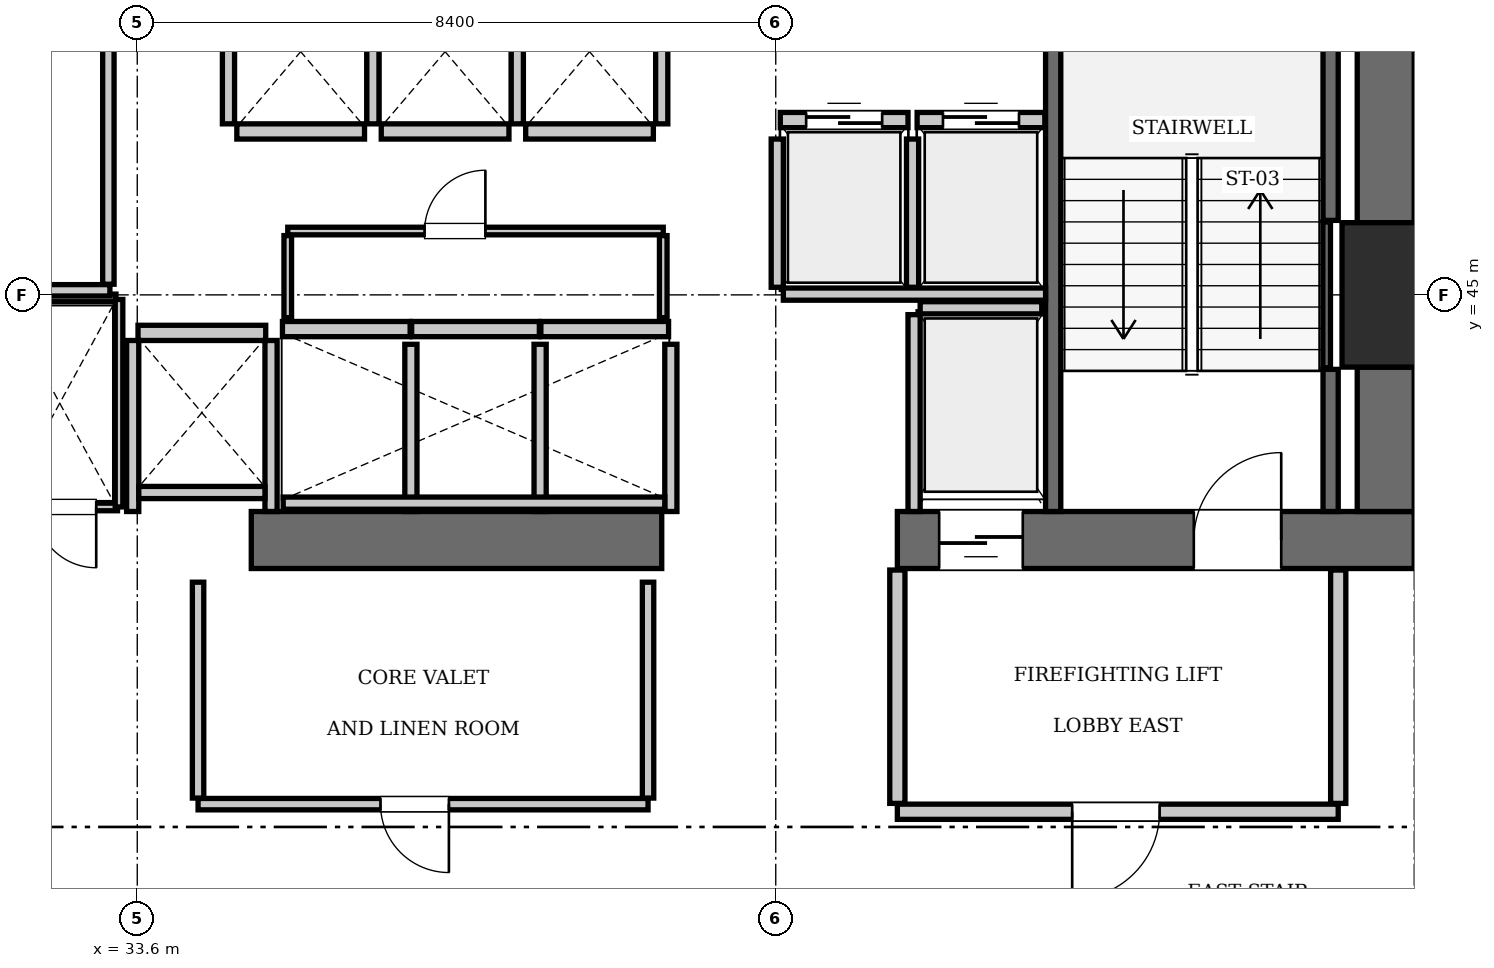
"""IFC4 building model, lengths in metres.
Left out: names, types, materials, properties, quantities, classifications, styles, units other than length and angle.
Written with IfcOpenShell. Run it as: python <this file> out.ifc"""

import sys

from ifc_helpers import new_model, si_unit, direction, frame, frame_2d, origin, origin_2d, place, context, subcontext, project, spatial, rectangle, extrude, element, fill, save


model = new_model("IFC4")
c1 = context("Model", 3, precision=1e-05, world=origin(), true_north=direction((0.0, 1.0)))
c2 = subcontext(c1, "Body", "Model", "MODEL_VIEW")
j1 = project(units=[si_unit("LENGTHUNIT", "METRE"), si_unit("PLANEANGLEUNIT", "RADIAN")], contexts=[c1])
p1 = place(None, origin())
s1 = spatial("IfcSite", under=j1, at=p1, CompositionType="ELEMENT")
p2 = place(p1, origin())
s2 = spatial("IfcBuilding", under=s1, at=p2, CompositionType="ELEMENT")
p3 = place(p2, frame((0.0, 0.0, 138.95)))
s3 = spatial("IfcBuildingStorey", under=s2, at=p3, CompositionType="ELEMENT", Elevation=138.95)
p4 = place(p3, frame((50.4, 45.0, 0.0), z_axis=(0.0, 0.0, 1.0), x_axis=(1.0, 0.0, 0.0)))
e1 = element("IfcColumn", 1, at=p4, inside=s3, PredefinedType="COLUMN", context=c2, shape_type="SweptSolid", body=[
    extrude(rectangle(XDim=1.9, YDim=1.9, at=origin_2d()), origin(), (0.0, 0.0, 1.0), 3.85),
])
p5 = place(p3, frame((35.1, 41.775, 0.0), z_axis=(0.0, 0.0, 1.0), x_axis=(1.0, 0.0, 0.0)))
e2 = element("IfcWall", 2, at=p5, inside=s3, PredefinedType="SHEAR", context=c2, shape_type="SweptSolid", body=[
    extrude(rectangle(XDim=5.4, YDim=0.75, at=frame_2d((2.7, 0.0))), origin(), (0.0, 0.0, 1.0), 3.85),
])
p6 = place(p3, frame((43.6, 41.775, 0.0), z_axis=(0.0, 0.0, 1.0), x_axis=(1.0, 0.0, 0.0)))
e3 = element("IfcWall", 3, at=p6, inside=s3, PredefinedType="SHEAR", context=c2, shape_type="SweptSolid", body=[
    extrude(rectangle(XDim=6.8, YDim=0.75, at=frame_2d((3.4, 0.0))), origin(), (0.0, 0.0, 1.0), 3.85),
])
p7 = place(p6, frame((3.9, 0.0, 0.0)))
e4 = element("IfcOpeningElement", 4, at=p7, cuts=e3, PredefinedType="OPENING", context=c2, shape_type="SweptSolid", body=[
    extrude(rectangle(XDim=1.15, YDim=2.15, at=frame_2d((0.575, 1.075))), frame((0.0, 0.385, 0.0), z_axis=(0.0, -1.0, 0.0), x_axis=(1.0, 0.0, 0.0)), (0.0, 0.0, 1.0), 0.77),
])
p8 = place(p6, frame((0.55, 0.0, 0.0)))
e5 = element("IfcOpeningElement", 5, at=p8, cuts=e3, PredefinedType="OPENING", context=c2, shape_type="SweptSolid", body=[
    extrude(rectangle(XDim=1.1, YDim=2.2, at=frame_2d((0.55, 1.1))), frame((0.0, 0.385, 0.0), z_axis=(0.0, -1.0, 0.0), x_axis=(1.0, 0.0, 0.0)), (0.0, 0.0, 1.0), 0.77),
])
p9 = place(p3, frame((50.025, 42.15, 0.0), z_axis=(0.0, 0.0, 1.0), x_axis=(0.0, 1.0, 0.0)))
e6 = element("IfcWall", 6, at=p9, inside=s3, PredefinedType="SHEAR", context=c2, shape_type="SweptSolid", body=[
    extrude(rectangle(XDim=1.9, YDim=0.75, at=frame_2d((0.95, 0.0))), origin(), (0.0, 0.0, 1.0), 3.85),
])
p10 = place(p3, frame((50.025, 45.95, 0.0), z_axis=(0.0, 0.0, 1.0), x_axis=(0.0, 1.0, 0.0)))
e7 = element("IfcWall", 7, at=p10, inside=s3, PredefinedType="SHEAR", context=c2, shape_type="SweptSolid", body=[
    extrude(rectangle(XDim=7.3, YDim=0.75, at=frame_2d((3.65, 0.0))), origin(), (0.0, 0.0, 1.0), 3.85),
])
p11 = place(p3, frame((45.65, 42.15, 0.0), z_axis=(0.0, 0.0, 1.0), x_axis=(0.0, 1.0, 0.0)))
e8 = element("IfcWall", 8, at=p11, inside=s3, PredefinedType="SOLIDWALL", context=c2, shape_type="SweptSolid", body=[
    extrude(rectangle(XDim=9.0, YDim=0.2, at=frame_2d((4.5, 0.0))), origin(), (0.0, 0.0, 1.0), 3.61),
])
p12 = place(p3, frame((49.3, 42.15, 0.0), z_axis=(0.0, 0.0, 1.0), x_axis=(0.0, 1.0, 0.0)))
e9 = element("IfcWall", 9, at=p12, inside=s3, PredefinedType="SOLIDWALL", context=c2, shape_type="SweptSolid", body=[
    extrude(rectangle(XDim=1.87, YDim=0.2, at=frame_2d((0.935, 0.0))), origin(), (0.0, 0.0, 1.0), 3.61),
])
p13 = place(p3, frame((49.3, 45.98, 0.0), z_axis=(0.0, 0.0, 1.0), x_axis=(0.0, 1.0, 0.0)))
e10 = element("IfcWall", 10, at=p13, inside=s3, PredefinedType="SOLIDWALL", context=c2, shape_type="SweptSolid", body=[
    extrude(rectangle(XDim=5.14, YDim=0.2, at=frame_2d((2.57, 0.0))), origin(), (0.0, 0.0, 1.0), 3.61),
])
p14 = place(p3, frame((49.248, 44.04, 0.0), z_axis=(0.0, 0.0, 1.0), x_axis=(0.0, 1.0, 0.0)))
e11 = element("IfcWall", 11, at=p14, inside=s3, PredefinedType="SOLIDWALL", context=c2, shape_type="SweptSolid", body=[
    extrude(rectangle(XDim=1.92, YDim=0.1, at=frame_2d((0.96, 0.0))), origin(), (0.0, 0.0, 1.0), 3.61),
])
p15 = place(p3, frame((42.06, 47.3, 0.0), z_axis=(0.0, 0.0, 1.0), x_axis=(1.0, 0.0, 0.0)))
e12 = element("IfcWall", 12, at=p15, inside=s3, PredefinedType="SOLIDWALL", context=c2, shape_type="SweptSolid", body=[
    extrude(rectangle(XDim=1.68, YDim=0.2, at=frame_2d((0.84, 0.0))), origin(), (0.0, 0.0, 1.0), 3.61),
])
p16 = place(p15, frame((0.34, 0.0, 0.0)))
e13 = element("IfcOpeningElement", 13, at=p16, cuts=e12, PredefinedType="OPENING", context=c2, shape_type="SweptSolid", body=[
    extrude(rectangle(XDim=1.0, YDim=2.15, at=frame_2d((0.5, 1.075))), frame((0.0, 0.11, 0.0), z_axis=(0.0, -1.0, 0.0), x_axis=(1.0, 0.0, 0.0)), (0.0, 0.0, 1.0), 0.22),
])
p17 = place(p3, frame((43.86, 47.3, 0.0), z_axis=(0.0, 0.0, 1.0), x_axis=(1.0, 0.0, 0.0)))
e14 = element("IfcWall", 14, at=p17, inside=s3, PredefinedType="SOLIDWALL", context=c2, shape_type="SweptSolid", body=[
    extrude(rectangle(XDim=1.68, YDim=0.2, at=frame_2d((0.84, 0.0))), origin(), (0.0, 0.0, 1.0), 3.61),
])
p18 = place(p17, frame((0.34, 0.0, 0.0)))
e15 = element("IfcOpeningElement", 15, at=p18, cuts=e14, PredefinedType="OPENING", context=c2, shape_type="SweptSolid", body=[
    extrude(rectangle(XDim=1.0, YDim=2.15, at=frame_2d((0.5, 1.075))), frame((0.0, 0.11, 0.0), z_axis=(0.0, -1.0, 0.0), x_axis=(1.0, 0.0, 0.0)), (0.0, 0.0, 1.0), 0.22),
])
for number, where, z_axis, x_axis in (
    (16, (35.51, 44.55, 0.0), (0.0, 0.0, 1.0), (1.0, 0.0, 0.0)),
    (17, (37.21, 44.55, 0.0), (0.0, 0.0, 1.0), (1.0, 0.0, 0.0)),
):
    element("IfcWall", number, at=place(p3, frame(where, z_axis=z_axis, x_axis=x_axis)), inside=s3, PredefinedType="SOLIDWALL", context=c2, shape_type="SweptSolid", body=[
        extrude(rectangle(XDim=1.68, YDim=0.2, at=frame_2d((0.84, 0.0))), origin(), (0.0, 0.0, 1.0), 3.61),
    ])
for number, where, z_axis, x_axis in (
    (18, (38.91, 44.55, 0.0), (0.0, 0.0, 1.0), (1.0, 0.0, 0.0)),
    (19, (34.91, 47.15, 0.0), (0.0, 0.0, 1.0), (1.0, 0.0, 0.0)),
):
    element("IfcWall", number, at=place(p3, frame(where, z_axis=z_axis, x_axis=x_axis)), inside=s3, PredefinedType="SOLIDWALL", context=c2, shape_type="SweptSolid", body=[
        extrude(rectangle(XDim=1.68, YDim=0.2, at=frame_2d((0.84, 0.0))), origin(), (0.0, 0.0, 1.0), 3.61),
    ])
for number, where, z_axis, x_axis in (
    (20, (36.81, 47.15, 0.0), (0.0, 0.0, 1.0), (1.0, 0.0, 0.0)),
    (21, (38.71, 47.15, 0.0), (0.0, 0.0, 1.0), (1.0, 0.0, 0.0)),
    (22, (33.61, 44.5, 0.0), (0.0, 0.0, 1.0), (1.0, 0.0, 0.0)),
):
    element("IfcWall", number, at=place(p3, frame(where, z_axis=z_axis, x_axis=x_axis)), inside=s3, PredefinedType="SOLIDWALL", context=c2, shape_type="SweptSolid", body=[
        extrude(rectangle(XDim=1.68, YDim=0.2, at=frame_2d((0.84, 0.0))), origin(), (0.0, 0.0, 1.0), 3.61),
    ])
p19 = place(p3, frame((43.9, 44.83, 0.0), z_axis=(0.0, 0.0, 1.0), x_axis=(1.0, 0.0, 0.0)))
e23 = element("IfcWall", 23, at=p19, inside=s3, PredefinedType="SOLIDWALL", context=c2, shape_type="SweptSolid", body=[
    extrude(rectangle(XDim=1.6, YDim=0.16, at=frame_2d((0.8, 0.0))), origin(), (0.0, 0.0, 1.0), 3.61),
])
p20 = place(p3, frame((43.82, 42.15, 0.0), z_axis=(0.0, 0.0, 1.0), x_axis=(0.0, 1.0, 0.0)))
e24 = element("IfcWall", 24, at=p20, inside=s3, PredefinedType="SOLIDWALL", context=c2, shape_type="SweptSolid", body=[
    extrude(rectangle(XDim=2.59, YDim=0.16, at=frame_2d((1.295, 0.0))), origin(), (0.0, 0.0, 1.0), 3.61),
])
for number, where, z_axis, x_axis in (
    (25, (42.02, 45.1, 0.0), (0.0, 0.0, 1.0), (0.0, 1.0, 0.0)),
    (26, (43.8, 45.1, 0.0), (0.0, 0.0, 1.0), (0.0, 1.0, 0.0)),
):
    element("IfcWall", number, at=place(p3, frame(where, z_axis=z_axis, x_axis=x_axis)), inside=s3, PredefinedType="SOLIDWALL", context=c2, shape_type="SweptSolid", body=[
        extrude(rectangle(XDim=1.95, YDim=0.16, at=frame_2d((0.975, 0.0))), origin(), (0.0, 0.0, 1.0), 3.61),
    ])
p21 = place(p3, frame((42.1, 45.01, 0.0), z_axis=(0.0, 0.0, 1.0), x_axis=(1.0, 0.0, 0.0)))
e27 = element("IfcWall", 27, at=p21, inside=s3, PredefinedType="SOLIDWALL", context=c2, shape_type="SweptSolid", body=[
    extrude(rectangle(XDim=3.45, YDim=0.16, at=frame_2d((1.725, 0.0))), origin(), (0.0, 0.0, 1.0), 3.61),
])
for number, where, z_axis, x_axis in (
    (28, (37.2, 42.15, 0.0), (0.0, 0.0, 1.0), (0.0, 1.0, 0.0)),
    (29, (38.9, 42.15, 0.0), (0.0, 0.0, 1.0), (0.0, 1.0, 0.0)),
    (30, (40.62, 42.15, 0.0), (0.0, 0.0, 1.0), (0.0, 1.0, 0.0)),
):
    element("IfcWall", number, at=place(p3, frame(where, z_axis=z_axis, x_axis=x_axis)), inside=s3, PredefinedType="SOLIDWALL", context=c2, shape_type="SweptSolid", body=[
        extrude(rectangle(XDim=2.2, YDim=0.16, at=frame_2d((1.1, 0.0))), origin(), (0.0, 0.0, 1.0), 3.61),
    ])
p22 = place(p3, frame((35.52, 42.26, 0.0), z_axis=(0.0, 0.0, 1.0), x_axis=(1.0, 0.0, 0.0)))
e31 = element("IfcWall", 31, at=p22, inside=s3, PredefinedType="SOLIDWALL", context=c2, shape_type="SweptSolid", body=[
    extrude(rectangle(XDim=5.02, YDim=0.16, at=frame_2d((2.51, 0.0))), origin(), (0.0, 0.0, 1.0), 3.61),
])
for number, where, z_axis, x_axis in (
    (32, (34.8, 47.25, 0.0), (0.0, 0.0, 1.0), (0.0, 1.0, 0.0)),
    (33, (36.7, 47.25, 0.0), (0.0, 0.0, 1.0), (0.0, 1.0, 0.0)),
    (34, (38.6, 47.25, 0.0), (0.0, 0.0, 1.0), (0.0, 1.0, 0.0)),
    (35, (40.5, 47.25, 0.0), (0.0, 0.0, 1.0), (0.0, 1.0, 0.0)),
):
    element("IfcWall", number, at=place(p3, frame(where, z_axis=z_axis, x_axis=x_axis)), inside=s3, PredefinedType="SOLIDWALL", context=c2, shape_type="SweptSolid", body=[
        extrude(rectangle(XDim=2.19, YDim=0.16, at=frame_2d((1.095, 0.0))), origin(), (0.0, 0.0, 1.0), 3.61),
    ])
for number, where, z_axis, x_axis in (
    (36, (33.54, 42.15, 0.0), (0.0, 0.0, 1.0), (0.0, 1.0, 0.0)),
    (37, (35.36, 42.15, 0.0), (0.0, 0.0, 1.0), (0.0, 1.0, 0.0)),
):
    element("IfcWall", number, at=place(p3, frame(where, z_axis=z_axis, x_axis=x_axis)), inside=s3, PredefinedType="SOLIDWALL", context=c2, shape_type="SweptSolid", body=[
        extrude(rectangle(XDim=2.25, YDim=0.16, at=frame_2d((1.125, 0.0))), origin(), (0.0, 0.0, 1.0), 3.61),
    ])
p23 = place(p3, frame((33.62, 42.4, 0.0), z_axis=(0.0, 0.0, 1.0), x_axis=(1.0, 0.0, 0.0)))
e38 = element("IfcWall", 38, at=p23, inside=s3, PredefinedType="SOLIDWALL", context=c2, shape_type="SweptSolid", body=[
    extrude(rectangle(XDim=1.66, YDim=0.16, at=frame_2d((0.83, 0.0))), origin(), (0.0, 0.0, 1.0), 3.61),
])
p24 = place(p3, frame((43.6, 38.2, 0.0), z_axis=(0.0, 0.0, 1.0), x_axis=(1.0, 0.0, 0.0)))
e39 = element("IfcWall", 39, at=p24, inside=s3, PredefinedType="PARTITIONING", context=c2, shape_type="SweptSolid", body=[
    extrude(rectangle(XDim=5.8, YDim=0.2, at=frame_2d((2.9, 0.0))), origin(), (0.0, 0.0, 1.0), 3.61),
])
p25 = place(p24, frame((2.3, 0.0, 0.0)))
e40 = element("IfcOpeningElement", 40, at=p25, cuts=e39, PredefinedType="OPENING", context=c2, shape_type="SweptSolid", body=[
    extrude(rectangle(XDim=1.15, YDim=2.15, at=frame_2d((0.575, 1.075))), frame((0.0, 0.11, 0.0), z_axis=(0.0, -1.0, 0.0), x_axis=(1.0, 0.0, 0.0)), (0.0, 0.0, 1.0), 0.22),
])
for number, where, z_axis, x_axis in (
    (41, (43.6, 38.31, 0.0), (0.0, 0.0, 1.0), (0.0, 1.0, 0.0)),
    (42, (49.4, 38.31, 0.0), (0.0, 0.0, 1.0), (0.0, 1.0, 0.0)),
):
    element("IfcWall", number, at=place(p3, frame(where, z_axis=z_axis, x_axis=x_axis)), inside=s3, PredefinedType="PARTITIONING", context=c2, shape_type="SweptSolid", body=[
        extrude(rectangle(XDim=3.07, YDim=0.2, at=frame_2d((1.535, 0.0))), origin(), (0.0, 0.0, 1.0), 3.61),
    ])
p26 = place(p3, frame((32.02, 42.21, 0.0), z_axis=(0.0, 0.0, 1.0), x_axis=(1.0, 0.0, 0.0)))
e43 = element("IfcWall", 43, at=p26, inside=s3, PredefinedType="PARTITIONING", context=c2, shape_type="SweptSolid", body=[
    extrude(rectangle(XDim=1.32, YDim=0.1, at=frame_2d((0.66, 0.0))), origin(), (0.0, 0.0, 1.0), 3.61),
])
p27 = place(p26, frame((0.24, 0.0, 0.0)))
e44 = element("IfcOpeningElement", 44, at=p27, cuts=e43, PredefinedType="OPENING", context=c2, shape_type="SweptSolid", body=[
    extrude(rectangle(XDim=0.8, YDim=2.05, at=frame_2d((0.4, 1.025))), frame((0.0, 0.06, 0.0), z_axis=(0.0, -1.0, 0.0), x_axis=(1.0, 0.0, 0.0)), (0.0, 0.0, 1.0), 0.12),
])
p28 = place(p3, frame((31.84, 44.96, 0.0), z_axis=(0.0, 0.0, 1.0), x_axis=(1.0, 0.0, 0.0)))
e45 = element("IfcWall", 45, at=p28, inside=s3, PredefinedType="PARTITIONING", context=c2, shape_type="SweptSolid", body=[
    extrude(rectangle(XDim=1.48, YDim=0.1, at=frame_2d((0.74, 0.0))), origin(), (0.0, 0.0, 1.0), 3.61),
])
p29 = place(p3, frame((33.36, 42.21, 0.0), z_axis=(0.0, 0.0, 1.0), x_axis=(0.0, 1.0, 0.0)))
e46 = element("IfcWall", 46, at=p29, inside=s3, PredefinedType="PARTITIONING", context=c2, shape_type="SweptSolid", body=[
    extrude(rectangle(XDim=2.73, YDim=0.1, at=frame_2d((1.365, 0.0))), origin(), (0.0, 0.0, 1.0), 3.61),
])
p30 = place(p3, frame((35.58, 45.84, 0.0), z_axis=(0.0, 0.0, 1.0), x_axis=(1.0, 0.0, 0.0)))
e47 = element("IfcWall", 47, at=p30, inside=s3, PredefinedType="PARTITIONING", context=c2, shape_type="SweptSolid", body=[
    extrude(rectangle(XDim=4.94, YDim=0.1, at=frame_2d((2.47, 0.0))), origin(), (0.0, 0.0, 1.0), 3.61),
])
p31 = place(p30, frame((1.8, 0.0, 0.0)))
e48 = element("IfcOpeningElement", 48, at=p31, cuts=e47, PredefinedType="OPENING", context=c2, shape_type="SweptSolid", body=[
    extrude(rectangle(XDim=0.8, YDim=2.05, at=frame_2d((0.4, 1.025))), frame((0.0, 0.06, 0.0), z_axis=(0.0, -1.0, 0.0), x_axis=(1.0, 0.0, 0.0)), (0.0, 0.0, 1.0), 0.12),
])
for number, where, z_axis, x_axis in (
    (49, (35.58, 44.7, 0.0), (0.0, 0.0, 1.0), (0.0, 1.0, 0.0)),
    (50, (40.52, 44.7, 0.0), (0.0, 0.0, 1.0), (0.0, 1.0, 0.0)),
):
    element("IfcWall", number, at=place(p3, frame(where, z_axis=z_axis, x_axis=x_axis)), inside=s3, PredefinedType="PARTITIONING", context=c2, shape_type="SweptSolid", body=[
        extrude(rectangle(XDim=1.08, YDim=0.1, at=frame_2d((0.54, 0.0))), origin(), (0.0, 0.0, 1.0), 3.61),
    ])
p32 = place(p3, frame((30.06, 45.06, 0.0), z_axis=(0.0, 0.0, 1.0), x_axis=(1.0, 0.0, 0.0)))
e51 = element("IfcWall", 51, at=p32, inside=s3, PredefinedType="PARTITIONING", context=c2, shape_type="SweptSolid", body=[
    extrude(rectangle(XDim=3.18, YDim=0.15, at=frame_2d((1.59, 0.0))), origin(), (0.0, 0.0, 1.0), 3.61),
])
p33 = place(p3, frame((33.22, 45.14, 0.0), z_axis=(0.0, 0.0, 1.0), x_axis=(0.0, 1.0, 0.0)))
e52 = element("IfcWall", 52, at=p33, inside=s3, PredefinedType="PARTITIONING", context=c2, shape_type="SweptSolid", body=[
    extrude(rectangle(XDim=4.16, YDim=0.15, at=frame_2d((2.08, 0.0))), origin(), (0.0, 0.0, 1.0), 3.61),
])
p34 = place(p3, frame((34.4, 38.3, 0.0), z_axis=(0.0, 0.0, 1.0), x_axis=(1.0, 0.0, 0.0)))
e53 = element("IfcWall", 53, at=p34, inside=s3, PredefinedType="PARTITIONING", context=c2, shape_type="SweptSolid", body=[
    extrude(rectangle(XDim=5.92, YDim=0.15, at=frame_2d((2.96, 0.0))), origin(), (0.0, 0.0, 1.0), 3.61),
])
p35 = place(p34, frame((2.4, 0.0, 0.0)))
e54 = element("IfcOpeningElement", 54, at=p35, cuts=e53, PredefinedType="OPENING", context=c2, shape_type="SweptSolid", body=[
    extrude(rectangle(XDim=0.9, YDim=2.1, at=frame_2d((0.45, 1.05))), frame((0.0, 0.085, 0.0), z_axis=(0.0, -1.0, 0.0), x_axis=(1.0, 0.0, 0.0)), (0.0, 0.0, 1.0), 0.17),
])
for number, where, z_axis, x_axis in (
    (55, (34.4, 38.38, 0.0), (0.0, 0.0, 1.0), (0.0, 1.0, 0.0)),
    (56, (40.32, 38.38, 0.0), (0.0, 0.0, 1.0), (0.0, 1.0, 0.0)),
):
    element("IfcWall", number, at=place(p3, frame(where, z_axis=z_axis, x_axis=x_axis)), inside=s3, PredefinedType="PARTITIONING", context=c2, shape_type="SweptSolid", body=[
        extrude(rectangle(XDim=2.84, YDim=0.15, at=frame_2d((1.42, 0.0))), origin(), (0.0, 0.0, 1.0), 3.61),
    ])
p36 = place(p7, origin())
e57 = element("IfcDoor", 57, at=p36, inside=s3, OperationType="SINGLE_SWING_RIGHT", PredefinedType="DOOR", context=c2, shape_type="SweptSolid", body=[
    extrude(rectangle(XDim=1.15, YDim=2.15, at=frame_2d((0.575, 1.075))), frame((0.0, 0.025, 0.0), z_axis=(0.0, -1.0, 0.0), x_axis=(1.0, 0.0, 0.0)), (0.0, 0.0, 1.0), 0.05),
])
fill(e4, e57)
p37 = place(p16, origin())
e58 = element("IfcDoor", 58, at=p37, inside=s3, OperationType="SLIDING_TO_LEFT", PredefinedType="DOOR", context=c2, shape_type="SweptSolid", body=[
    extrude(rectangle(XDim=1.0, YDim=2.15, at=frame_2d((0.5, 1.075))), frame((0.0, 0.025, 0.0), z_axis=(0.0, -1.0, 0.0), x_axis=(1.0, 0.0, 0.0)), (0.0, 0.0, 1.0), 0.05),
])
fill(e13, e58)
p38 = place(p18, origin())
e59 = element("IfcDoor", 59, at=p38, inside=s3, OperationType="SLIDING_TO_LEFT", PredefinedType="DOOR", context=c2, shape_type="SweptSolid", body=[
    extrude(rectangle(XDim=1.0, YDim=2.15, at=frame_2d((0.5, 1.075))), frame((0.0, 0.025, 0.0), z_axis=(0.0, -1.0, 0.0), x_axis=(1.0, 0.0, 0.0)), (0.0, 0.0, 1.0), 0.05),
])
fill(e15, e59)
p39 = place(p8, frame((1.1, 0.0, 0.0), z_axis=(0.0, 0.0, 1.0), x_axis=(-1.0, 0.0, 0.0)))
e60 = element("IfcDoor", 60, at=p39, inside=s3, OperationType="SLIDING_TO_LEFT", PredefinedType="DOOR", context=c2, shape_type="SweptSolid", body=[
    extrude(rectangle(XDim=1.1, YDim=2.2, at=frame_2d((0.55, 1.1))), frame((0.0, 0.025, 0.0), z_axis=(0.0, -1.0, 0.0), x_axis=(1.0, 0.0, 0.0)), (0.0, 0.0, 1.0), 0.05),
])
fill(e5, e60)
p40 = place(p25, frame((1.15, 0.0, 0.0), z_axis=(0.0, 0.0, 1.0), x_axis=(-1.0, 0.0, 0.0)))
e61 = element("IfcDoor", 61, at=p40, inside=s3, OperationType="SINGLE_SWING_RIGHT", PredefinedType="DOOR", context=c2, shape_type="SweptSolid", body=[
    extrude(rectangle(XDim=1.15, YDim=2.15, at=frame_2d((0.575, 1.075))), frame((0.0, 0.025, 0.0), z_axis=(0.0, -1.0, 0.0), x_axis=(1.0, 0.0, 0.0)), (0.0, 0.0, 1.0), 0.05),
])
fill(e40, e61)
p41 = place(p27, frame((0.8, 0.0, 0.0), z_axis=(0.0, 0.0, 1.0), x_axis=(-1.0, 0.0, 0.0)))
e62 = element("IfcDoor", 62, at=p41, inside=s3, OperationType="SINGLE_SWING_LEFT", PredefinedType="DOOR", context=c2, shape_type="SweptSolid", body=[
    extrude(rectangle(XDim=0.8, YDim=2.05, at=frame_2d((0.4, 1.025))), frame((0.0, 0.025, 0.0), z_axis=(0.0, -1.0, 0.0), x_axis=(1.0, 0.0, 0.0)), (0.0, 0.0, 1.0), 0.05),
])
fill(e44, e62)
p42 = place(p31, origin())
e63 = element("IfcDoor", 63, at=p42, inside=s3, OperationType="SINGLE_SWING_RIGHT", PredefinedType="DOOR", context=c2, shape_type="SweptSolid", body=[
    extrude(rectangle(XDim=0.8, YDim=2.05, at=frame_2d((0.4, 1.025))), frame((0.0, 0.025, 0.0), z_axis=(0.0, -1.0, 0.0), x_axis=(1.0, 0.0, 0.0)), (0.0, 0.0, 1.0), 0.05),
])
fill(e48, e63)
p43 = place(p35, frame((0.9, 0.0, 0.0), z_axis=(0.0, 0.0, 1.0), x_axis=(-1.0, 0.0, 0.0)))
e64 = element("IfcDoor", 64, at=p43, inside=s3, OperationType="SINGLE_SWING_LEFT", PredefinedType="DOOR", context=c2, shape_type="SweptSolid", body=[
    extrude(rectangle(XDim=0.9, YDim=2.1, at=frame_2d((0.45, 1.05))), frame((0.0, 0.025, 0.0), z_axis=(0.0, -1.0, 0.0), x_axis=(1.0, 0.0, 0.0)), (0.0, 0.0, 1.0), 0.05),
])
fill(e54, e64)
save(model, sys.argv[1])
